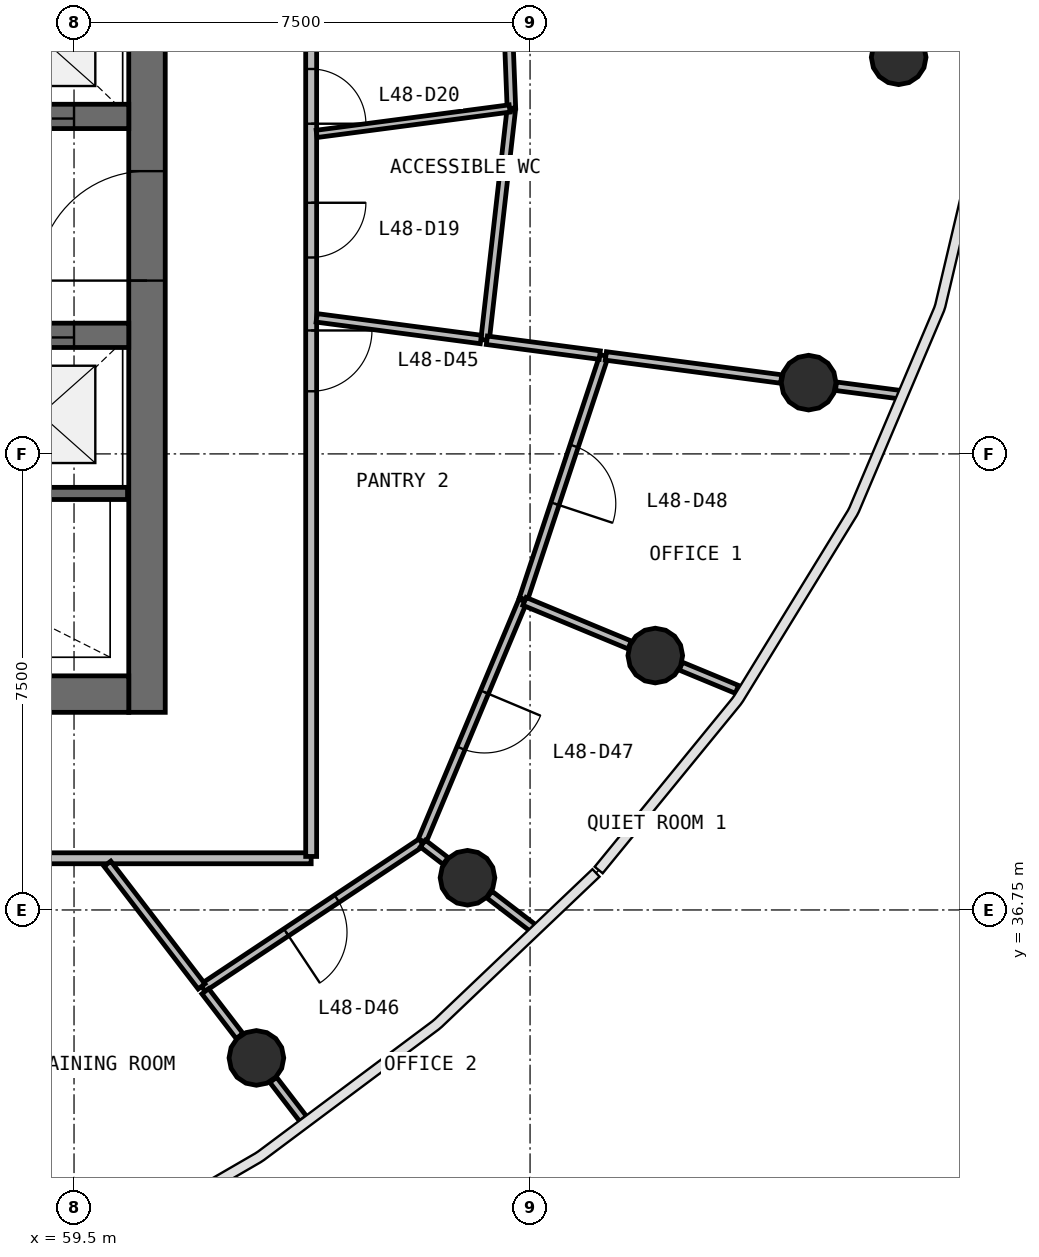
"""IFC4 building model, lengths in metres.
Left out: names, types, materials, properties, quantities, classifications, styles, units other than length and angle.
Written with IfcOpenShell. Run it as: python <this file> out.ifc"""

import sys

from ifc_helpers import new_model, si_unit, direction, frame, frame_2d, origin, origin_2d, place, context, subcontext, project, spatial, rectangle, circle, extrude, source, transform, mapped, element, fill, save


model = new_model("IFC4")
c1 = context("Model", 3, precision=1e-05, world=origin(), true_north=direction((0.0, 1.0)))
c2 = subcontext(c1, "Body", "Model", "MODEL_VIEW")
j1 = project(units=[si_unit("LENGTHUNIT", "METRE"), si_unit("PLANEANGLEUNIT", "RADIAN")], contexts=[c1])
p1 = place(None, origin())
s1 = spatial("IfcSite", under=j1, at=p1, CompositionType="ELEMENT")
p2 = place(p1, origin())
s2 = spatial("IfcBuilding", under=s1, at=p2, CompositionType="ELEMENT")
p3 = place(p2, frame((0.0, 0.0, 199.4)))
s3 = spatial("IfcBuildingStorey", under=s2, at=p3, CompositionType="ELEMENT", Elevation=199.4)
p4 = place(p3, frame((60.7, 40.0, 0.0), z_axis=(0.0, 0.0, 1.0), x_axis=(0.0, 1.0, 0.0)))
e1 = element("IfcWall", 1, at=p4, inside=s3, PredefinedType="SHEAR", context=c2, shape_type="SweptSolid", body=[
    extrude(rectangle(XDim=16.0, YDim=0.6, at=frame_2d((8.0, 0.0))), origin(), (0.0, 0.0, 1.0), 3.9),
])
p5 = place(p4, frame((7.1, 0.0, 0.0)))
e2 = element("IfcOpeningElement", 2, at=p5, cuts=e1, PredefinedType="OPENING", context=c2, shape_type="SweptSolid", body=[
    extrude(rectangle(XDim=1.8, YDim=2.1, at=frame_2d((0.9, 1.05))), frame((0.0, 0.31, 0.0), z_axis=(0.0, -1.0, 0.0), x_axis=(1.0, 0.0, 0.0)), (0.0, 0.0, 1.0), 0.62),
])
p6 = place(p3, frame((43.6, 40.3, 0.0), z_axis=(0.0, 0.0, 1.0), x_axis=(1.0, 0.0, 0.0)))
e3 = element("IfcWall", 3, at=p6, inside=s3, PredefinedType="SHEAR", context=c2, shape_type="SweptSolid", body=[
    extrude(rectangle(XDim=16.8, YDim=0.6, at=frame_2d((8.4, 0.0))), origin(), (0.0, 0.0, 1.0), 3.9),
])
p7 = place(p6, frame((10.3, 0.0, 0.0)))
e4 = element("IfcOpeningElement", 4, at=p7, cuts=e3, PredefinedType="OPENING", context=c2, shape_type="SweptSolid", body=[
    extrude(rectangle(XDim=1.2, YDim=2.1, at=frame_2d((0.6, 1.05))), frame((0.0, 0.31, 0.0), z_axis=(0.0, -1.0, 0.0), x_axis=(1.0, 0.0, 0.0)), (0.0, 0.0, 1.0), 0.62),
])
p8 = place(p6, frame((7.25, 0.0, 0.0)))
e5 = element("IfcOpeningElement", 5, at=p8, cuts=e3, PredefinedType="OPENING", context=c2, shape_type="SweptSolid", body=[
    extrude(rectangle(XDim=1.1, YDim=2.1, at=frame_2d((0.55, 1.05))), frame((0.0, 0.31, 0.0), z_axis=(0.0, -1.0, 0.0), x_axis=(1.0, 0.0, 0.0)), (0.0, 0.0, 1.0), 0.62),
])
p9 = place(p6, frame((0.7, 0.0, 0.0)))
e6 = element("IfcOpeningElement", 6, at=p9, cuts=e3, PredefinedType="OPENING", context=c2, shape_type="SweptSolid", body=[
    extrude(rectangle(XDim=0.8, YDim=2.1, at=frame_2d((0.4, 1.05))), frame((0.0, 0.31, 0.0), z_axis=(0.0, -1.0, 0.0), x_axis=(1.0, 0.0, 0.0)), (0.0, 0.0, 1.0), 0.62),
])
p10 = place(p3, frame((43.6, 49.8, 0.0), z_axis=(0.0, 0.0, 1.0), x_axis=(1.0, 0.0, 0.0)))
e7 = element("IfcWall", 7, at=p10, inside=s3, PredefinedType="SHEAR", context=c2, shape_type="SweptSolid", body=[
    extrude(rectangle(XDim=16.8, YDim=0.4, at=frame_2d((8.4, 0.0))), origin(), (0.0, 0.0, 1.0), 3.9),
])
p11 = place(p10, frame((9.8, 0.0, 0.0)))
e8 = element("IfcOpeningElement", 8, at=p11, cuts=e7, PredefinedType="OPENING", context=c2, shape_type="SweptSolid", body=[
    extrude(rectangle(XDim=1.1, YDim=2.1, at=frame_2d((0.55, 1.05))), frame((0.0, 0.21, 0.0), z_axis=(0.0, -1.0, 0.0), x_axis=(1.0, 0.0, 0.0)), (0.0, 0.0, 1.0), 0.42),
])
p12 = place(p10, frame((12.3, 0.0, 0.0)))
e9 = element("IfcOpeningElement", 9, at=p12, cuts=e7, PredefinedType="OPENING", context=c2, shape_type="SweptSolid", body=[
    extrude(rectangle(XDim=1.1, YDim=2.1, at=frame_2d((0.55, 1.05))), frame((0.0, 0.21, 0.0), z_axis=(0.0, -1.0, 0.0), x_axis=(1.0, 0.0, 0.0)), (0.0, 0.0, 1.0), 0.42),
])
p13 = place(p10, frame((14.8, 0.0, 0.0)))
e10 = element("IfcOpeningElement", 10, at=p13, cuts=e7, PredefinedType="OPENING", context=c2, shape_type="SweptSolid", body=[
    extrude(rectangle(XDim=1.1, YDim=2.1, at=frame_2d((0.55, 1.05))), frame((0.0, 0.21, 0.0), z_axis=(0.0, -1.0, 0.0), x_axis=(1.0, 0.0, 0.0)), (0.0, 0.0, 1.0), 0.42),
])
p14 = place(p10, frame((4.45, 0.0, 0.0)))
e11 = element("IfcOpeningElement", 11, at=p14, cuts=e7, PredefinedType="OPENING", context=c2, shape_type="SweptSolid", body=[
    extrude(rectangle(XDim=0.9, YDim=2.1, at=frame_2d((0.45, 1.05))), frame((0.0, 0.21, 0.0), z_axis=(0.0, -1.0, 0.0), x_axis=(1.0, 0.0, 0.0)), (0.0, 0.0, 1.0), 0.42),
])
p15 = place(p10, frame((7.85, 0.0, 0.0)))
e12 = element("IfcOpeningElement", 12, at=p15, cuts=e7, PredefinedType="OPENING", context=c2, shape_type="SweptSolid", body=[
    extrude(rectangle(XDim=0.9, YDim=2.1, at=frame_2d((0.45, 1.05))), frame((0.0, 0.21, 0.0), z_axis=(0.0, -1.0, 0.0), x_axis=(1.0, 0.0, 0.0)), (0.0, 0.0, 1.0), 0.42),
])
p16 = place(p3, frame((43.6, 46.2, 0.0), z_axis=(0.0, 0.0, 1.0), x_axis=(1.0, 0.0, 0.0)))
e13 = element("IfcWall", 13, at=p16, inside=s3, PredefinedType="SHEAR", context=c2, shape_type="SweptSolid", body=[
    extrude(rectangle(XDim=16.8, YDim=0.4, at=frame_2d((8.4, 0.0))), origin(), (0.0, 0.0, 1.0), 3.9),
])
p17 = place(p16, frame((9.8, 0.0, 0.0)))
e14 = element("IfcOpeningElement", 14, at=p17, cuts=e13, PredefinedType="OPENING", context=c2, shape_type="SweptSolid", body=[
    extrude(rectangle(XDim=1.1, YDim=2.1, at=frame_2d((0.55, 1.05))), frame((0.0, 0.21, 0.0), z_axis=(0.0, -1.0, 0.0), x_axis=(1.0, 0.0, 0.0)), (0.0, 0.0, 1.0), 0.42),
])
p18 = place(p16, frame((12.3, 0.0, 0.0)))
e15 = element("IfcOpeningElement", 15, at=p18, cuts=e13, PredefinedType="OPENING", context=c2, shape_type="SweptSolid", body=[
    extrude(rectangle(XDim=1.1, YDim=2.1, at=frame_2d((0.55, 1.05))), frame((0.0, 0.21, 0.0), z_axis=(0.0, -1.0, 0.0), x_axis=(1.0, 0.0, 0.0)), (0.0, 0.0, 1.0), 0.42),
])
p19 = place(p16, frame((14.8, 0.0, 0.0)))
e16 = element("IfcOpeningElement", 16, at=p19, cuts=e13, PredefinedType="OPENING", context=c2, shape_type="SweptSolid", body=[
    extrude(rectangle(XDim=1.1, YDim=2.1, at=frame_2d((0.55, 1.05))), frame((0.0, 0.21, 0.0), z_axis=(0.0, -1.0, 0.0), x_axis=(1.0, 0.0, 0.0)), (0.0, 0.0, 1.0), 0.42),
])
p20 = place(p16, frame((7.85, 0.0, 0.0)))
e17 = element("IfcOpeningElement", 17, at=p20, cuts=e13, PredefinedType="OPENING", context=c2, shape_type="SweptSolid", body=[
    extrude(rectangle(XDim=0.9, YDim=2.1, at=frame_2d((0.45, 1.05))), frame((0.0, 0.21, 0.0), z_axis=(0.0, -1.0, 0.0), x_axis=(1.0, 0.0, 0.0)), (0.0, 0.0, 1.0), 0.42),
])
m1 = source(origin(), c2, "Body", "SweptSolid", [
    extrude(circle(Radius=0.45, at=origin_2d()), origin(), (0.0, 0.0, 1.0), 3.9),
])
for number, where, z_axis, x_axis in (
    (18, (73.062, 50.773, 0.0), (0.0, 0.0, 1.0), (1.0, 0.0, 0.0)),
    (19, (62.499, 34.317, 0.0), (0.0, 0.0, 1.0), (1.0, 0.0, 0.0)),
    (20, (65.971, 37.28, 0.0), (0.0, 0.0, 1.0), (1.0, 0.0, 0.0)),
    (21, (69.059, 40.934, 0.0), (0.0, 0.0, 1.0), (1.0, 0.0, 0.0)),
    (22, (71.581, 45.422, 0.0), (0.0, 0.0, 1.0), (1.0, 0.0, 0.0)),
):
    element("IfcColumn", number, at=place(p3, frame(where, z_axis=z_axis, x_axis=x_axis)), inside=s3, PredefinedType="COLUMN", context=c2, shape_type="MappedRepresentation", body=[
        mapped(m1, transform((0.0, 0.0, 0.0), scale=1.0)),
    ])
p21 = place(p3, frame((57.7, 43.6, 0.0), z_axis=(0.0, 0.0, 1.0), x_axis=(1.0, 0.0, 0.0)))
e23 = element("IfcWall", 23, at=p21, inside=s3, PredefinedType="SOLIDWALL", context=c2, shape_type="SweptSolid", body=[
    extrude(rectangle(XDim=2.68, YDim=0.2, at=frame_2d((1.34, 0.0))), origin(), (0.0, 0.0, 1.0), 3.58),
])
p22 = place(p3, frame((63.4, 37.6, 0.0), z_axis=(0.0, 0.0, 1.0), x_axis=(-1.0, 0.0, 0.0)))
e24 = element("IfcWall", 24, at=p22, inside=s3, PredefinedType="PARTITIONING", context=c2, shape_type="SweptSolid", body=[
    extrude(rectangle(XDim=22.8, YDim=0.18, at=frame_2d((11.4, 0.0))), origin(), (0.0, 0.0, 1.0), 2.88),
])
p23 = place(p22, frame((12.95, 0.0, 0.0)))
e25 = element("IfcOpeningElement", 25, at=p23, cuts=e24, PredefinedType="OPENING", context=c2, shape_type="SweptSolid", body=[
    extrude(rectangle(XDim=1.0, YDim=2.1, at=frame_2d((0.5, 1.05))), frame((0.0, 0.1, 0.0), z_axis=(0.0, -1.0, 0.0), x_axis=(1.0, 0.0, 0.0)), (0.0, 0.0, 1.0), 0.2),
])
p24 = place(p22, frame((10.95, 0.0, 0.0)))
e26 = element("IfcOpeningElement", 26, at=p24, cuts=e24, PredefinedType="OPENING", context=c2, shape_type="SweptSolid", body=[
    extrude(rectangle(XDim=1.0, YDim=2.1, at=frame_2d((0.5, 1.05))), frame((0.0, 0.1, 0.0), z_axis=(0.0, -1.0, 0.0), x_axis=(1.0, 0.0, 0.0)), (0.0, 0.0, 1.0), 0.2),
])
p25 = place(p22, frame((5.75, 0.0, 0.0)))
e27 = element("IfcOpeningElement", 27, at=p25, cuts=e24, PredefinedType="OPENING", context=c2, shape_type="SweptSolid", body=[
    extrude(rectangle(XDim=1.0, YDim=2.1, at=frame_2d((0.5, 1.05))), frame((0.0, 0.1, 0.0), z_axis=(0.0, -1.0, 0.0), x_axis=(1.0, 0.0, 0.0)), (0.0, 0.0, 1.0), 0.2),
])
p26 = place(p3, frame((63.4, 58.37, 0.0), z_axis=(0.0, 0.0, 1.0), x_axis=(0.0, -1.0, 0.0)))
e28 = element("IfcWall", 28, at=p26, inside=s3, PredefinedType="PARTITIONING", context=c2, shape_type="SweptSolid", body=[
    extrude(rectangle(XDim=20.74, YDim=0.18, at=frame_2d((10.37, 0.0))), origin(), (0.0, 0.0, 1.0), 2.88),
])
p27 = place(p26, frame((9.99, 0.0, 0.0)))
e29 = element("IfcOpeningElement", 29, at=p27, cuts=e28, PredefinedType="OPENING", context=c2, shape_type="SweptSolid", body=[
    extrude(rectangle(XDim=0.9, YDim=2.1, at=frame_2d((0.45, 1.05))), frame((0.0, 0.1, 0.0), z_axis=(0.0, -1.0, 0.0), x_axis=(1.0, 0.0, 0.0)), (0.0, 0.0, 1.0), 0.2),
])
p28 = place(p26, frame((7.79, 0.0, 0.0)))
e30 = element("IfcOpeningElement", 30, at=p28, cuts=e28, PredefinedType="OPENING", context=c2, shape_type="SweptSolid", body=[
    extrude(rectangle(XDim=0.9, YDim=2.1, at=frame_2d((0.45, 1.05))), frame((0.0, 0.1, 0.0), z_axis=(0.0, -1.0, 0.0), x_axis=(1.0, 0.0, 0.0)), (0.0, 0.0, 1.0), 0.2),
])
p29 = place(p26, frame((4.29, 0.0, 0.0)))
e31 = element("IfcOpeningElement", 31, at=p29, cuts=e28, PredefinedType="OPENING", context=c2, shape_type="SweptSolid", body=[
    extrude(rectangle(XDim=1.0, YDim=2.1, at=frame_2d((0.5, 1.05))), frame((0.0, 0.1, 0.0), z_axis=(0.0, -1.0, 0.0), x_axis=(1.0, 0.0, 0.0)), (0.0, 0.0, 1.0), 0.2),
])
p30 = place(p26, frame((12.09, 0.0, 0.0)))
e32 = element("IfcOpeningElement", 32, at=p30, cuts=e28, PredefinedType="OPENING", context=c2, shape_type="SweptSolid", body=[
    extrude(rectangle(XDim=1.0, YDim=2.1, at=frame_2d((0.5, 1.05))), frame((0.0, 0.1, 0.0), z_axis=(0.0, -1.0, 0.0), x_axis=(1.0, 0.0, 0.0)), (0.0, 0.0, 1.0), 0.2),
])
p31 = place(p3, frame((65.214, 37.861, 0.0), z_axis=(0.0, 0.0, 1.0), x_axis=(-0.832762432558, -0.553630500353, 0.0)))
e33 = element("IfcWall", 33, at=p31, inside=s3, PredefinedType="PARTITIONING", context=c2, shape_type="SweptSolid", body=[
    extrude(rectangle(XDim=4.321, YDim=0.14, at=frame_2d((2.16, 0.0))), origin(), (0.0, 0.0, 1.0), 2.88),
])
p32 = place(p31, frame((1.671, 0.0, 0.0)))
e34 = element("IfcOpeningElement", 34, at=p32, cuts=e33, PredefinedType="OPENING", context=c2, shape_type="SweptSolid", body=[
    extrude(rectangle(XDim=1.0, YDim=2.1, at=frame_2d((0.5, 1.05))), frame((0.0, 0.08, 0.0), z_axis=(0.0, -1.0, 0.0), x_axis=(1.0, 0.0, 0.0)), (0.0, 0.0, 1.0), 0.16),
])
p33 = place(p3, frame((66.882, 41.836, 0.0), z_axis=(0.0, 0.0, 1.0), x_axis=(-0.386845581472, -0.922144509335, 0.0)))
e35 = element("IfcWall", 35, at=p33, inside=s3, PredefinedType="PARTITIONING", context=c2, shape_type="SweptSolid", body=[
    extrude(rectangle(XDim=4.281, YDim=0.14, at=frame_2d((2.14, 0.0))), origin(), (0.0, 0.0, 1.0), 2.88),
])
p34 = place(p33, frame((1.631, 0.0, 0.0)))
e36 = element("IfcOpeningElement", 36, at=p34, cuts=e35, PredefinedType="OPENING", context=c2, shape_type="SweptSolid", body=[
    extrude(rectangle(XDim=1.0, YDim=2.1, at=frame_2d((0.5, 1.05))), frame((0.0, 0.08, 0.0), z_axis=(0.0, -1.0, 0.0), x_axis=(1.0, 0.0, 0.0)), (0.0, 0.0, 1.0), 0.16),
])
p35 = place(p3, frame((68.217, 45.865, 0.0), z_axis=(0.0, 0.0, 1.0), x_axis=(-0.314593796034, -0.94922639212, 0.0)))
e37 = element("IfcWall", 37, at=p35, inside=s3, PredefinedType="PARTITIONING", context=c2, shape_type="SweptSolid", body=[
    extrude(rectangle(XDim=4.215, YDim=0.14, at=frame_2d((2.107, 0.0))), origin(), (0.0, 0.0, 1.0), 2.88),
])
p36 = place(p35, frame((1.565, 0.0, 0.0)))
e38 = element("IfcOpeningElement", 38, at=p36, cuts=e37, PredefinedType="OPENING", context=c2, shape_type="SweptSolid", body=[
    extrude(rectangle(XDim=1.0, YDim=2.1, at=frame_2d((0.5, 1.05))), frame((0.0, 0.08, 0.0), z_axis=(0.0, -1.0, 0.0), x_axis=(1.0, 0.0, 0.0)), (0.0, 0.0, 1.0), 0.16),
])
p37 = place(p3, frame((66.693, 49.934, 0.0), z_axis=(0.0, 0.0, 1.0), x_axis=(-0.038671022185, 0.999251996267, 0.0)))
e39 = element("IfcWall", 39, at=p37, inside=s3, PredefinedType="PARTITIONING", context=c2, shape_type="SweptSolid", body=[
    extrude(rectangle(XDim=4.059, YDim=0.14, at=frame_2d((2.03, 0.0))), origin(), (0.0, 0.0, 1.0), 2.88),
])
p38 = place(p3, frame((66.26, 46.123, 0.0), z_axis=(0.0, 0.0, 1.0), x_axis=(0.112951423427, 0.993600511245, 0.0)))
e40 = element("IfcWall", 40, at=p38, inside=s3, PredefinedType="PARTITIONING", context=c2, shape_type="SweptSolid", body=[
    extrude(rectangle(XDim=3.806, YDim=0.14, at=frame_2d((1.903, 0.0))), origin(), (0.0, 0.0, 1.0), 2.88),
])
p39 = place(p3, frame((68.247, 45.861, 0.0), z_axis=(0.0, 0.0, 1.0), x_axis=(0.991445722729, -0.130519649411, 0.0)))
e41 = element("IfcWall", 41, at=p39, inside=s3, PredefinedType="PARTITIONING", context=c2, shape_type="SweptSolid", body=[
    extrude(rectangle(XDim=2.909, YDim=0.14, at=frame_2d((1.454, 0.0))), origin(), (0.0, 0.0, 1.0), 2.88),
])
p40 = place(p3, frame((63.49, 46.487, 0.0), z_axis=(0.0, 0.0, 1.0), x_axis=(0.99144880359, -0.130496244624, 0.0)))
e42 = element("IfcWall", 42, at=p40, inside=s3, PredefinedType="PARTITIONING", context=c2, shape_type="SweptSolid", body=[
    extrude(rectangle(XDim=2.724, YDim=0.14, at=frame_2d((1.362, 0.0))), origin(), (0.0, 0.0, 1.0), 2.88),
])
p41 = place(p3, frame((60.049, 37.51, 0.0), z_axis=(0.0, 0.0, 1.0), x_axis=(0.608703571787, -0.793397732348, 0.0)))
e43 = element("IfcWall", 43, at=p41, inside=s3, PredefinedType="PARTITIONING", context=c2, shape_type="SweptSolid", body=[
    extrude(rectangle(XDim=2.543, YDim=0.14, at=frame_2d((1.271, 0.0))), origin(), (0.0, 0.0, 1.0), 2.88),
])
p42 = place(p3, frame((66.29, 46.119, 0.0), z_axis=(0.0, 0.0, 1.0), x_axis=(0.991446305504, -0.130515222489, 0.0)))
e44 = element("IfcWall", 44, at=p42, inside=s3, PredefinedType="PARTITIONING", context=c2, shape_type="SweptSolid", body=[
    extrude(rectangle(XDim=1.873, YDim=0.14, at=frame_2d((0.936, 0.0))), origin(), (0.0, 0.0, 1.0), 2.88),
])
p43 = place(p3, frame((66.909, 41.824, 0.0), z_axis=(0.0, 0.0, 1.0), x_axis=(0.923865843613, -0.382716478617, 0.0)))
e45 = element("IfcWall", 45, at=p43, inside=s3, PredefinedType="PARTITIONING", context=c2, shape_type="SweptSolid", body=[
    extrude(rectangle(XDim=1.872, YDim=0.14, at=frame_2d((0.936, 0.0))), origin(), (0.0, 0.0, 1.0), 2.88),
])
p44 = place(p3, frame((72.031, 45.363, 0.0), z_axis=(0.0, 0.0, 1.0), x_axis=(0.991454295543, -0.130454512571, 0.0)))
e46 = element("IfcWall", 46, at=p44, inside=s3, PredefinedType="PARTITIONING", context=c2, shape_type="SweptSolid", body=[
    extrude(rectangle(XDim=1.067, YDim=0.14, at=frame_2d((0.533, 0.0))), origin(), (0.0, 0.0, 1.0), 2.88),
])
p45 = place(p3, frame((69.48, 40.76, 0.0), z_axis=(0.0, 0.0, 1.0), x_axis=(0.923927521376, -0.382567556445, 0.0)))
e47 = element("IfcWall", 47, at=p45, inside=s3, PredefinedType="PARTITIONING", context=c2, shape_type="SweptSolid", body=[
    extrude(rectangle(XDim=0.999, YDim=0.14, at=frame_2d((0.5, 0.0))), origin(), (0.0, 0.0, 1.0), 2.88),
])
p46 = place(p3, frame((61.658, 35.413, 0.0), z_axis=(0.0, 0.0, 1.0), x_axis=(0.60873011284, -0.79337736905, 0.0)))
e48 = element("IfcWall", 48, at=p46, inside=s3, PredefinedType="PARTITIONING", context=c2, shape_type="SweptSolid", body=[
    extrude(rectangle(XDim=0.927, YDim=0.14, at=frame_2d((0.463, 0.0))), origin(), (0.0, 0.0, 1.0), 2.88),
])
p47 = place(p3, frame((66.332, 37.003, 0.0), z_axis=(0.0, 0.0, 1.0), x_axis=(0.79343675283, -0.608652708249, 0.0)))
e49 = element("IfcWall", 49, at=p47, inside=s3, PredefinedType="PARTITIONING", context=c2, shape_type="SweptSolid", body=[
    extrude(rectangle(XDim=0.904, YDim=0.14, at=frame_2d((0.452, 0.0))), origin(), (0.0, 0.0, 1.0), 2.88),
])
p48 = place(p3, frame((62.776, 33.956, 0.0), z_axis=(0.0, 0.0, 1.0), x_axis=(0.60901253632, -0.793160595721, 0.0)))
e50 = element("IfcWall", 50, at=p48, inside=s3, PredefinedType="PARTITIONING", context=c2, shape_type="SweptSolid", body=[
    extrude(rectangle(XDim=0.811, YDim=0.14, at=frame_2d((0.406, 0.0))), origin(), (0.0, 0.0, 1.0), 2.88),
])
p49 = place(p3, frame((65.238, 37.842, 0.0), z_axis=(0.0, 0.0, 1.0), x_axis=(0.793338522039, -0.608780740044, 0.0)))
e51 = element("IfcWall", 51, at=p49, inside=s3, PredefinedType="PARTITIONING", context=c2, shape_type="SweptSolid", body=[
    extrude(rectangle(XDim=0.47, YDim=0.14, at=frame_2d((0.235, 0.0))), origin(), (0.0, 0.0, 1.0), 2.88),
])
p50 = place(p3, frame((63.49, 49.513, 0.0), z_axis=(0.0, 0.0, 1.0), x_axis=(0.991448323654, 0.130499890897, 0.0)))
e52 = element("IfcWall", 52, at=p50, inside=s3, PredefinedType="PARTITIONING", context=c2, shape_type="SweptSolid", body=[
    extrude(rectangle(XDim=3.201, YDim=0.12, at=frame_2d((1.601, 0.0))), origin(), (0.0, 0.0, 1.0), 2.88),
])
m2 = source(origin(), c2, "Body", "SweptSolid", [
    extrude(rectangle(XDim=1.8, YDim=2.1, at=frame_2d((0.9, 1.05))), frame((0.0, 0.025, 0.0), z_axis=(0.0, -1.0, 0.0), x_axis=(1.0, 0.0, 0.0)), (0.0, 0.0, 1.0), 0.05),
])
p51 = place(p5, origin())
e53 = element("IfcDoor", 53, at=p51, inside=s3, OperationType="SINGLE_SWING_LEFT", PredefinedType="DOOR", context=c2, shape_type="MappedRepresentation", body=[
    mapped(m2, transform((0.0, 0.0, 0.0), scale=1.0)),
])
fill(e2, e53)
m3 = source(origin(), c2, "Body", "SweptSolid", [
    extrude(rectangle(XDim=1.1, YDim=2.1, at=frame_2d((0.55, 1.05))), frame((0.0, 0.025, 0.0), z_axis=(0.0, -1.0, 0.0), x_axis=(1.0, 0.0, 0.0)), (0.0, 0.0, 1.0), 0.05),
])
p52 = place(p13, origin())
e54 = element("IfcDoor", 54, at=p52, inside=s3, OperationType="DOUBLE_DOOR_SLIDING", PredefinedType="USERDEFINED", context=c2, shape_type="MappedRepresentation", body=[
    mapped(m3, transform((0.0, 0.0, 0.0), scale=1.0)),
])
fill(e10, e54)
p53 = place(p19, origin())
e55 = element("IfcDoor", 55, at=p53, inside=s3, OperationType="DOUBLE_DOOR_SLIDING", PredefinedType="USERDEFINED", context=c2, shape_type="MappedRepresentation", body=[
    mapped(m3, transform((0.0, 0.0, 0.0), scale=1.0)),
])
fill(e16, e55)
m4 = source(origin(), c2, "Body", "SweptSolid", [
    extrude(rectangle(XDim=0.9, YDim=2.1, at=frame_2d((0.45, 1.05))), frame((0.0, 0.025, 0.0), z_axis=(0.0, -1.0, 0.0), x_axis=(1.0, 0.0, 0.0)), (0.0, 0.0, 1.0), 0.05),
])
p54 = place(p27, origin())
e56 = element("IfcDoor", 56, at=p54, inside=s3, OperationType="SINGLE_SWING_LEFT", PredefinedType="DOOR", context=c2, shape_type="MappedRepresentation", body=[
    mapped(m4, transform((0.0, 0.0, 0.0), scale=1.0)),
])
fill(e29, e56)
p55 = place(p28, origin())
e57 = element("IfcDoor", 57, at=p55, inside=s3, OperationType="SINGLE_SWING_RIGHT", PredefinedType="DOOR", context=c2, shape_type="MappedRepresentation", body=[
    mapped(m4, transform((0.0, 0.0, 0.0), scale=1.0)),
])
fill(e30, e57)
m5 = source(origin(), c2, "Body", "SweptSolid", [
    extrude(rectangle(XDim=1.0, YDim=2.1, at=frame_2d((0.5, 1.05))), frame((0.0, 0.025, 0.0), z_axis=(0.0, -1.0, 0.0), x_axis=(1.0, 0.0, 0.0)), (0.0, 0.0, 1.0), 0.05),
])
p56 = place(p30, origin())
e58 = element("IfcDoor", 58, at=p56, inside=s3, OperationType="SINGLE_SWING_LEFT", PredefinedType="DOOR", context=c2, shape_type="MappedRepresentation", body=[
    mapped(m5, transform((0.0, 0.0, 0.0), scale=1.0)),
])
fill(e32, e58)
p57 = place(p32, origin())
e59 = element("IfcDoor", 59, at=p57, inside=s3, OperationType="SINGLE_SWING_RIGHT", PredefinedType="DOOR", context=c2, shape_type="MappedRepresentation", body=[
    mapped(m5, transform((0.0, 0.0, 0.0), scale=1.0)),
])
fill(e34, e59)
p58 = place(p34, origin())
e60 = element("IfcDoor", 60, at=p58, inside=s3, OperationType="SINGLE_SWING_LEFT", PredefinedType="DOOR", context=c2, shape_type="MappedRepresentation", body=[
    mapped(m5, transform((0.0, 0.0, 0.0), scale=1.0)),
])
fill(e36, e60)
p59 = place(p36, origin())
e61 = element("IfcDoor", 61, at=p59, inside=s3, OperationType="SINGLE_SWING_RIGHT", PredefinedType="DOOR", context=c2, shape_type="MappedRepresentation", body=[
    mapped(m5, transform((0.0, 0.0, 0.0), scale=1.0)),
])
fill(e38, e61)
save(model, sys.argv[1])
